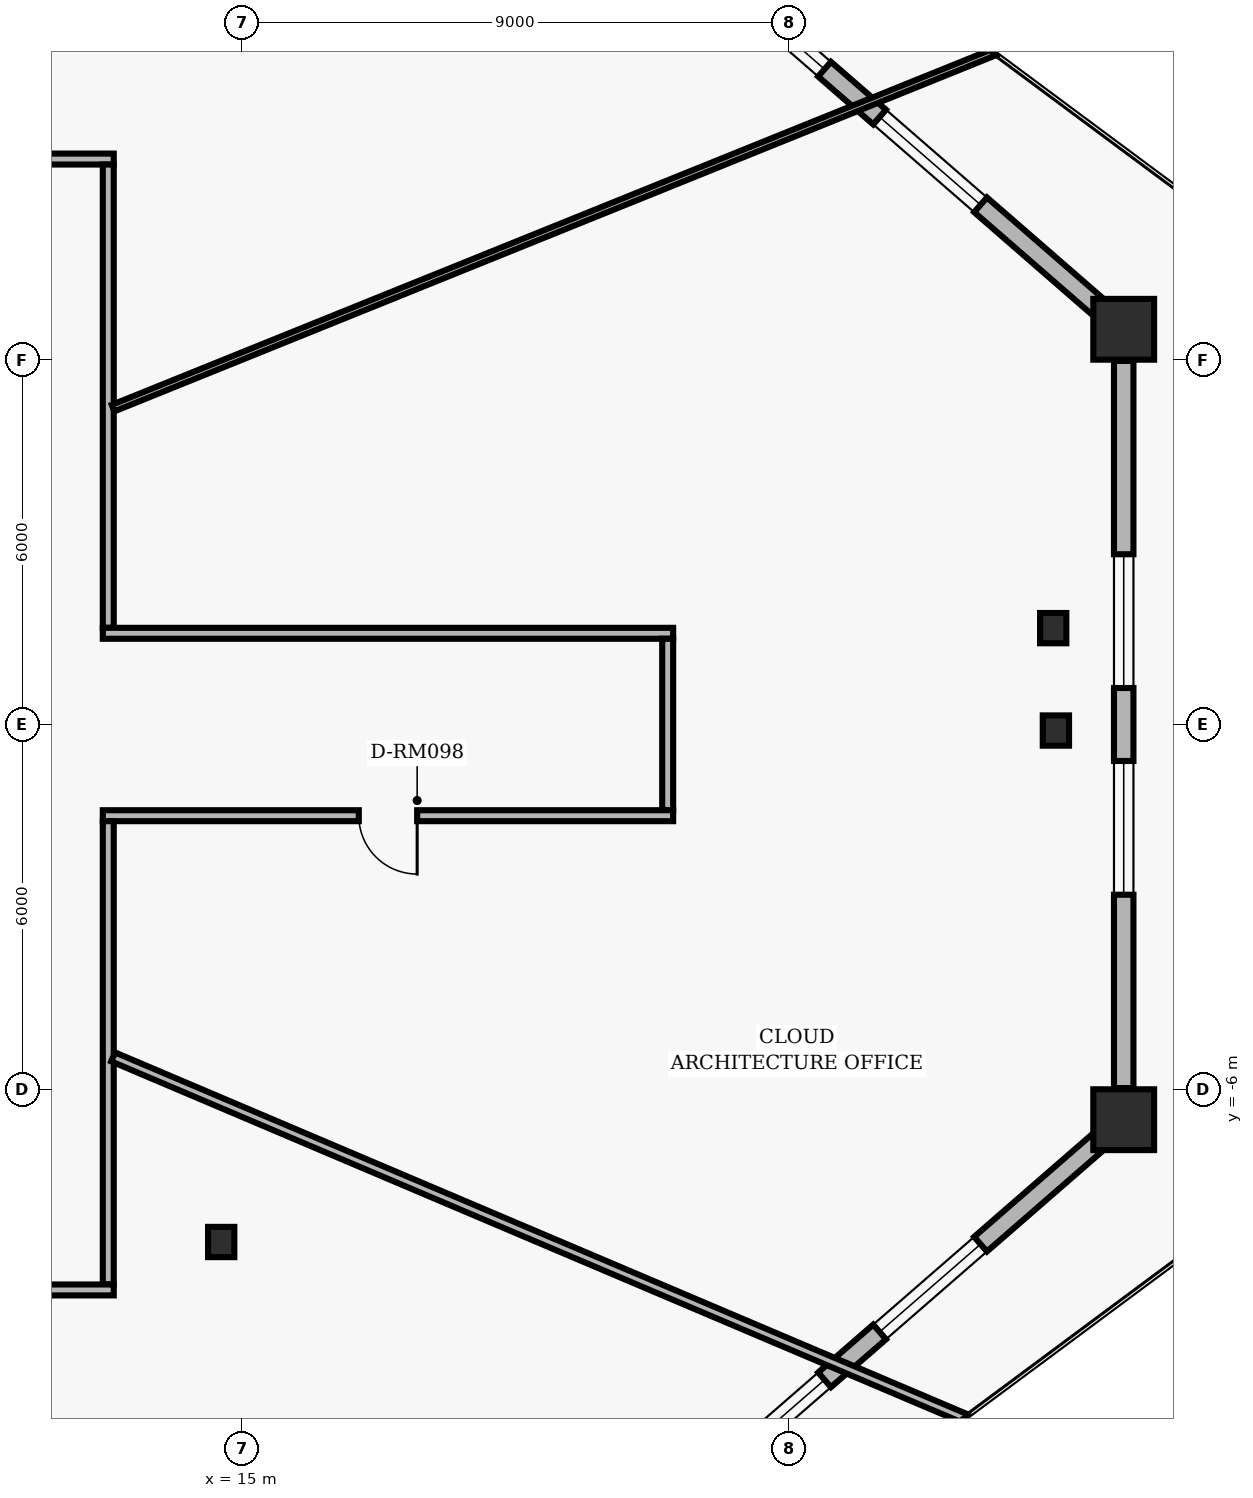
"""IFC4 building model, lengths in metres.
Left out: names, types, materials, properties, quantities, classifications, styles, units other than length and angle.
Written with IfcOpenShell. Run it as: python <this file> out.ifc"""

import sys

from ifc_helpers import new_model, si_unit, direction, frame, frame_2d, origin, origin_2d, place, context, subcontext, project, spatial, rectangle, i_section, extrude, element, fill, save


model = new_model("IFC4")
c1 = context("Model", 3, precision=1e-05, world=origin(), true_north=direction((0.0, 1.0)))
c2 = subcontext(c1, "Body", "Model", "MODEL_VIEW")
j1 = project(units=[si_unit("LENGTHUNIT", "METRE"), si_unit("PLANEANGLEUNIT", "RADIAN")], contexts=[c1])
p1 = place(None, origin())
s1 = spatial("IfcSite", under=j1, at=p1, CompositionType="ELEMENT")
p2 = place(p1, origin())
s2 = spatial("IfcBuilding", under=s1, at=p2, CompositionType="ELEMENT")
p3 = place(p2, frame((0.0, 0.0, 15.36)))
s3 = spatial("IfcBuildingStorey", under=s2, at=p3, CompositionType="ELEMENT", Elevation=15.36)
for number, where, z_axis, x_axis in (
    (1, (29.5, -6.5, 0.0), (0.0, 0.0, 1.0), (1.0, 0.0, 0.0)),
    (2, (29.5, 6.5, 0.0), (0.0, 0.0, 1.0), (1.0, 0.0, 0.0)),
):
    element("IfcColumn", number, at=place(p3, frame(where, z_axis=z_axis, x_axis=x_axis)), inside=s3, PredefinedType="COLUMN", context=c2, shape_type="SweptSolid", body=[
        extrude(rectangle(XDim=1.0, YDim=1.0, at=origin_2d()), origin(), (0.0, 0.0, 1.0), 3.52),
    ])
for number, where, z_axis, x_axis in (
    (3, (28.341, 1.585, 0.0), (0.0, 0.0, 1.0), (1.0, 0.0, 0.0)),
    (4, (14.657, -8.512, 0.0), (0.0, 0.0, 1.0), (1.0, 0.0, 0.0)),
    (5, (28.385, -0.1, 0.0), (0.0, 0.0, 1.0), (1.0, 0.0, 0.0)),
):
    element("IfcColumn", number, at=place(p3, frame(where, z_axis=z_axis, x_axis=x_axis)), inside=s3, PredefinedType="COLUMN", context=c2, shape_type="SweptSolid", body=[
        extrude(i_section(OverallWidth=0.432, OverallDepth=0.498, WebThickness=0.056, FlangeThickness=0.089, FilletRadius=0.025, at=origin_2d()), origin(), (0.0, 0.0, 1.0), 3.52),
    ])
p4 = place(p3, frame((29.108, -6.841, 0.0), z_axis=(0.0, 0.0, 1.0), x_axis=(-0.754615886195, -0.656166796098, 0.0)))
e6 = element("IfcWall", 6, at=p4, inside=s3, PredefinedType="SOLIDWALL", context=c2, shape_type="SweptSolid", body=[
    extrude(rectangle(XDim=14.2, YDim=0.32, at=frame_2d((7.1, 0.0))), origin(), (0.0, 0.0, 1.0), 1.65),
])
p5 = place(p4, frame((2.6, 0.0, 0.4)))
e7 = element("IfcOpeningElement", 7, at=p5, cuts=e6, PredefinedType="OPENING", context=c2, shape_type="SweptSolid", body=[
    extrude(rectangle(XDim=2.2, YDim=1.1, at=frame_2d((1.1, 0.55))), frame((0.0, 0.17, 0.0), z_axis=(0.0, -1.0, 0.0), x_axis=(1.0, 0.0, 0.0)), (0.0, 0.0, 1.0), 0.34),
])
p6 = place(p4, frame((6.0, 0.0, 0.4)))
e8 = element("IfcOpeningElement", 8, at=p6, cuts=e6, PredefinedType="OPENING", context=c2, shape_type="SweptSolid", body=[
    extrude(rectangle(XDim=2.2, YDim=1.1, at=frame_2d((1.1, 0.55))), frame((0.0, 0.17, 0.0), z_axis=(0.0, -1.0, 0.0), x_axis=(1.0, 0.0, 0.0)), (0.0, 0.0, 1.0), 0.34),
])
p7 = place(p4, frame((9.4, 0.0, 0.4)))
e9 = element("IfcOpeningElement", 9, at=p7, cuts=e6, PredefinedType="OPENING", context=c2, shape_type="SweptSolid", body=[
    extrude(rectangle(XDim=2.2, YDim=1.1, at=frame_2d((1.1, 0.55))), frame((0.0, 0.17, 0.0), z_axis=(0.0, -1.0, 0.0), x_axis=(1.0, 0.0, 0.0)), (0.0, 0.0, 1.0), 0.34),
])
p8 = place(p3, frame((29.5, 5.98, 0.0), z_axis=(0.0, 0.0, 1.0), x_axis=(0.0, -1.0, 0.0)))
e10 = element("IfcWall", 10, at=p8, inside=s3, PredefinedType="SOLIDWALL", context=c2, shape_type="SweptSolid", body=[
    extrude(rectangle(XDim=11.96, YDim=0.32, at=frame_2d((5.98, 0.0))), origin(), (0.0, 0.0, 1.0), 1.65),
])
p9 = place(p8, frame((3.18, 0.0, 0.4)))
e11 = element("IfcOpeningElement", 11, at=p9, cuts=e10, PredefinedType="OPENING", context=c2, shape_type="SweptSolid", body=[
    extrude(rectangle(XDim=2.2, YDim=1.1, at=frame_2d((1.1, 0.55))), frame((0.0, 0.17, 0.0), z_axis=(0.0, -1.0, 0.0), x_axis=(1.0, 0.0, 0.0)), (0.0, 0.0, 1.0), 0.34),
])
p10 = place(p8, frame((6.58, 0.0, 0.4)))
e12 = element("IfcOpeningElement", 12, at=p10, cuts=e10, PredefinedType="OPENING", context=c2, shape_type="SweptSolid", body=[
    extrude(rectangle(XDim=2.2, YDim=1.1, at=frame_2d((1.1, 0.55))), frame((0.0, 0.17, 0.0), z_axis=(0.0, -1.0, 0.0), x_axis=(1.0, 0.0, 0.0)), (0.0, 0.0, 1.0), 0.34),
])
p11 = place(p3, frame((18.392, 16.159, 0.0), z_axis=(0.0, 0.0, 1.0), x_axis=(0.754615886195, -0.656166796098, 0.0)))
e13 = element("IfcWall", 13, at=p11, inside=s3, PredefinedType="SOLIDWALL", context=c2, shape_type="SweptSolid", body=[
    extrude(rectangle(XDim=14.2, YDim=0.32, at=frame_2d((7.1, 0.0))), origin(), (0.0, 0.0, 1.0), 1.65),
])
p12 = place(p11, frame((2.6, 0.0, 0.4)))
e14 = element("IfcOpeningElement", 14, at=p12, cuts=e13, PredefinedType="OPENING", context=c2, shape_type="SweptSolid", body=[
    extrude(rectangle(XDim=2.2, YDim=1.1, at=frame_2d((1.1, 0.55))), frame((0.0, 0.17, 0.0), z_axis=(0.0, -1.0, 0.0), x_axis=(1.0, 0.0, 0.0)), (0.0, 0.0, 1.0), 0.34),
])
p13 = place(p11, frame((6.0, 0.0, 0.4)))
e15 = element("IfcOpeningElement", 15, at=p13, cuts=e13, PredefinedType="OPENING", context=c2, shape_type="SweptSolid", body=[
    extrude(rectangle(XDim=2.2, YDim=1.1, at=frame_2d((1.1, 0.55))), frame((0.0, 0.17, 0.0), z_axis=(0.0, -1.0, 0.0), x_axis=(1.0, 0.0, 0.0)), (0.0, 0.0, 1.0), 0.34),
])
p14 = place(p11, frame((9.4, 0.0, 0.4)))
e16 = element("IfcOpeningElement", 16, at=p14, cuts=e13, PredefinedType="OPENING", context=c2, shape_type="SweptSolid", body=[
    extrude(rectangle(XDim=2.2, YDim=1.1, at=frame_2d((1.1, 0.55))), frame((0.0, 0.17, 0.0), z_axis=(0.0, -1.0, 0.0), x_axis=(1.0, 0.0, 0.0)), (0.0, 0.0, 1.0), 0.34),
])
p15 = place(p3, frame((-12.89, 9.3, 0.0), z_axis=(0.0, 0.0, 1.0), x_axis=(1.0, 0.0, 0.0)))
e17 = element("IfcWall", 17, at=p15, inside=s3, PredefinedType="PARTITIONING", context=c2, shape_type="SweptSolid", body=[
    extrude(rectangle(XDim=25.78, YDim=0.18, at=frame_2d((12.89, 0.0))), origin(), (0.0, 0.0, 1.0), 2.587),
])
p16 = place(p15, frame((20.623, 0.0, 0.0)))
e18 = element("IfcOpeningElement", 18, at=p16, cuts=e17, PredefinedType="OPENING", context=c2, shape_type="SweptSolid", body=[
    extrude(rectangle(XDim=0.96, YDim=2.02, at=frame_2d((0.48, 1.01))), frame((0.0, 0.1, 0.0), z_axis=(0.0, -1.0, 0.0), x_axis=(1.0, 0.0, 0.0)), (0.0, 0.0, 1.0), 0.2),
])
p17 = place(p15, frame((12.66, 0.0, 0.0)))
e19 = element("IfcOpeningElement", 19, at=p17, cuts=e17, PredefinedType="OPENING", context=c2, shape_type="SweptSolid", body=[
    extrude(rectangle(XDim=1.02, YDim=2.02, at=frame_2d((0.51, 1.01))), frame((0.0, 0.1, 0.0), z_axis=(0.0, -1.0, 0.0), x_axis=(1.0, 0.0, 0.0)), (0.0, 0.0, 1.0), 0.2),
])
p18 = place(p15, frame((4.478, 0.0, 0.0)))
e20 = element("IfcOpeningElement", 20, at=p18, cuts=e17, PredefinedType="OPENING", context=c2, shape_type="SweptSolid", body=[
    extrude(rectangle(XDim=0.96, YDim=2.02, at=frame_2d((0.48, 1.01))), frame((0.0, 0.1, 0.0), z_axis=(0.0, -1.0, 0.0), x_axis=(1.0, 0.0, 0.0)), (0.0, 0.0, 1.0), 0.2),
])
p19 = place(p3, frame((12.8, 9.21, 0.0), z_axis=(0.0, 0.0, 1.0), x_axis=(0.0, -1.0, 0.0)))
e21 = element("IfcWall", 21, at=p19, inside=s3, PredefinedType="PARTITIONING", context=c2, shape_type="SweptSolid", body=[
    extrude(rectangle(XDim=7.62, YDim=0.18, at=frame_2d((3.81, 0.0))), origin(), (0.0, 0.0, 1.0), 3.073),
])
p20 = place(p3, frame((12.71, 1.5, 0.0), z_axis=(0.0, 0.0, 1.0), x_axis=(1.0, 0.0, 0.0)))
e22 = element("IfcWall", 22, at=p20, inside=s3, PredefinedType="PARTITIONING", context=c2, shape_type="SweptSolid", body=[
    extrude(rectangle(XDim=9.38, YDim=0.18, at=frame_2d((4.69, 0.0))), origin(), (0.0, 0.0, 1.0), 3.073),
])
p21 = place(p3, frame((22.0, 1.41, 0.0), z_axis=(0.0, 0.0, 1.0), x_axis=(0.0, -1.0, 0.0)))
e23 = element("IfcWall", 23, at=p21, inside=s3, PredefinedType="PARTITIONING", context=c2, shape_type="SweptSolid", body=[
    extrude(rectangle(XDim=2.82, YDim=0.18, at=frame_2d((1.41, 0.0))), origin(), (0.0, 0.0, 1.0), 3.073),
])
p22 = place(p3, frame((22.09, -1.5, 0.0), z_axis=(0.0, 0.0, 1.0), x_axis=(-1.0, 0.0, 0.0)))
e24 = element("IfcWall", 24, at=p22, inside=s3, PredefinedType="PARTITIONING", context=c2, shape_type="SweptSolid", body=[
    extrude(rectangle(XDim=9.38, YDim=0.18, at=frame_2d((4.69, 0.0))), origin(), (0.0, 0.0, 1.0), 3.073),
])
p23 = place(p22, frame((4.21, 0.0, 0.0)))
e25 = element("IfcOpeningElement", 25, at=p23, cuts=e24, PredefinedType="OPENING", context=c2, shape_type="SweptSolid", body=[
    extrude(rectangle(XDim=0.96, YDim=2.02, at=frame_2d((0.48, 1.01))), frame((0.0, 0.1, 0.0), z_axis=(0.0, -1.0, 0.0), x_axis=(1.0, 0.0, 0.0)), (0.0, 0.0, 1.0), 0.2),
])
p24 = place(p3, frame((12.8, -1.59, 0.0), z_axis=(0.0, 0.0, 1.0), x_axis=(0.0, -1.0, 0.0)))
e26 = element("IfcWall", 26, at=p24, inside=s3, PredefinedType="PARTITIONING", context=c2, shape_type="SweptSolid", body=[
    extrude(rectangle(XDim=7.62, YDim=0.18, at=frame_2d((3.81, 0.0))), origin(), (0.0, 0.0, 1.0), 3.073),
])
p25 = place(p3, frame((12.89, -9.3, 0.0), z_axis=(0.0, 0.0, 1.0), x_axis=(-1.0, 0.0, 0.0)))
e27 = element("IfcWall", 27, at=p25, inside=s3, PredefinedType="PARTITIONING", context=c2, shape_type="SweptSolid", body=[
    extrude(rectangle(XDim=25.78, YDim=0.18, at=frame_2d((12.89, 0.0))), origin(), (0.0, 0.0, 1.0), 2.587),
])
p26 = place(p25, frame((20.866, 0.0, 0.0)))
e28 = element("IfcOpeningElement", 28, at=p26, cuts=e27, PredefinedType="OPENING", context=c2, shape_type="SweptSolid", body=[
    extrude(rectangle(XDim=0.96, YDim=2.02, at=frame_2d((0.48, 1.01))), frame((0.0, 0.1, 0.0), z_axis=(0.0, -1.0, 0.0), x_axis=(1.0, 0.0, 0.0)), (0.0, 0.0, 1.0), 0.2),
])
p27 = place(p25, frame((12.748, 0.0, 0.0)))
e29 = element("IfcOpeningElement", 29, at=p27, cuts=e27, PredefinedType="OPENING", context=c2, shape_type="SweptSolid", body=[
    extrude(rectangle(XDim=0.96, YDim=2.02, at=frame_2d((0.48, 1.01))), frame((0.0, 0.1, 0.0), z_axis=(0.0, -1.0, 0.0), x_axis=(1.0, 0.0, 0.0)), (0.0, 0.0, 1.0), 0.2),
])
p28 = place(p25, frame((4.292, 0.0, 0.0)))
e30 = element("IfcOpeningElement", 30, at=p28, cuts=e27, PredefinedType="OPENING", context=c2, shape_type="SweptSolid", body=[
    extrude(rectangle(XDim=0.96, YDim=2.02, at=frame_2d((0.48, 1.01))), frame((0.0, 0.1, 0.0), z_axis=(0.0, -1.0, 0.0), x_axis=(1.0, 0.0, 0.0)), (0.0, 0.0, 1.0), 0.2),
])
p29 = place(p3, frame((12.88, -5.467, 0.0), z_axis=(0.0, 0.0, 1.0), x_axis=(0.920509657283, -0.390719811181, 0.0)))
e31 = element("IfcWall", 31, at=p29, inside=s3, PredefinedType="PARTITIONING", context=c2, shape_type="SweptSolid", body=[
    extrude(rectangle(XDim=15.234, YDim=0.16, at=frame_2d((7.617, 0.0))), origin(), (0.0, 0.0, 1.0), 3.073),
])
p30 = place(p3, frame((12.88, 5.204, 0.0), z_axis=(0.0, 0.0, 1.0), x_axis=(0.927184819219, 0.374604205809, 0.0)))
e32 = element("IfcWall", 32, at=p30, inside=s3, PredefinedType="MOVABLE", context=c2, shape_type="SweptSolid", body=[
    extrude(rectangle(XDim=15.642, YDim=0.115, at=frame_2d((7.821, 0.0))), origin(), (0.0, 0.0, 1.0), 1.893),
])
p31 = place(p5, origin())
e33 = element("IfcWindow", 33, at=p31, inside=s3, PartitioningType="SINGLE_PANEL", PredefinedType="WINDOW", context=c2, shape_type="SweptSolid", body=[
    extrude(rectangle(XDim=2.2, YDim=1.1, at=frame_2d((1.1, 0.55))), frame((0.0, 0.03, 0.0), z_axis=(0.0, -1.0, 0.0), x_axis=(1.0, 0.0, 0.0)), (0.0, 0.0, 1.0), 0.06),
])
fill(e7, e33)
p32 = place(p6, origin())
e34 = element("IfcWindow", 34, at=p32, inside=s3, PartitioningType="SINGLE_PANEL", PredefinedType="WINDOW", context=c2, shape_type="SweptSolid", body=[
    extrude(rectangle(XDim=2.2, YDim=1.1, at=frame_2d((1.1, 0.55))), frame((0.0, 0.03, 0.0), z_axis=(0.0, -1.0, 0.0), x_axis=(1.0, 0.0, 0.0)), (0.0, 0.0, 1.0), 0.06),
])
fill(e8, e34)
p33 = place(p9, origin())
e35 = element("IfcWindow", 35, at=p33, inside=s3, PartitioningType="SINGLE_PANEL", PredefinedType="WINDOW", context=c2, shape_type="SweptSolid", body=[
    extrude(rectangle(XDim=2.2, YDim=1.1, at=frame_2d((1.1, 0.55))), frame((0.0, 0.03, 0.0), z_axis=(0.0, -1.0, 0.0), x_axis=(1.0, 0.0, 0.0)), (0.0, 0.0, 1.0), 0.06),
])
fill(e11, e35)
p34 = place(p10, origin())
e36 = element("IfcWindow", 36, at=p34, inside=s3, PartitioningType="SINGLE_PANEL", PredefinedType="WINDOW", context=c2, shape_type="SweptSolid", body=[
    extrude(rectangle(XDim=2.2, YDim=1.1, at=frame_2d((1.1, 0.55))), frame((0.0, 0.03, 0.0), z_axis=(0.0, -1.0, 0.0), x_axis=(1.0, 0.0, 0.0)), (0.0, 0.0, 1.0), 0.06),
])
fill(e12, e36)
p35 = place(p13, origin())
e37 = element("IfcWindow", 37, at=p35, inside=s3, PartitioningType="SINGLE_PANEL", PredefinedType="WINDOW", context=c2, shape_type="SweptSolid", body=[
    extrude(rectangle(XDim=2.2, YDim=1.1, at=frame_2d((1.1, 0.55))), frame((0.0, 0.03, 0.0), z_axis=(0.0, -1.0, 0.0), x_axis=(1.0, 0.0, 0.0)), (0.0, 0.0, 1.0), 0.06),
])
fill(e15, e37)
p36 = place(p14, origin())
e38 = element("IfcWindow", 38, at=p36, inside=s3, PartitioningType="SINGLE_PANEL", PredefinedType="WINDOW", context=c2, shape_type="SweptSolid", body=[
    extrude(rectangle(XDim=2.2, YDim=1.1, at=frame_2d((1.1, 0.55))), frame((0.0, 0.03, 0.0), z_axis=(0.0, -1.0, 0.0), x_axis=(1.0, 0.0, 0.0)), (0.0, 0.0, 1.0), 0.06),
])
fill(e16, e38)
p37 = place(p23, origin())
e39 = element("IfcDoor", 39, at=p37, inside=s3, OperationType="SINGLE_SWING_LEFT", PredefinedType="DOOR", context=c2, shape_type="SweptSolid", body=[
    extrude(rectangle(XDim=0.96, YDim=2.02, at=frame_2d((0.48, 1.01))), frame((0.0, 0.025, 0.0), z_axis=(0.0, -1.0, 0.0), x_axis=(1.0, 0.0, 0.0)), (0.0, 0.0, 1.0), 0.05),
])
fill(e25, e39)
save(model, sys.argv[1])
